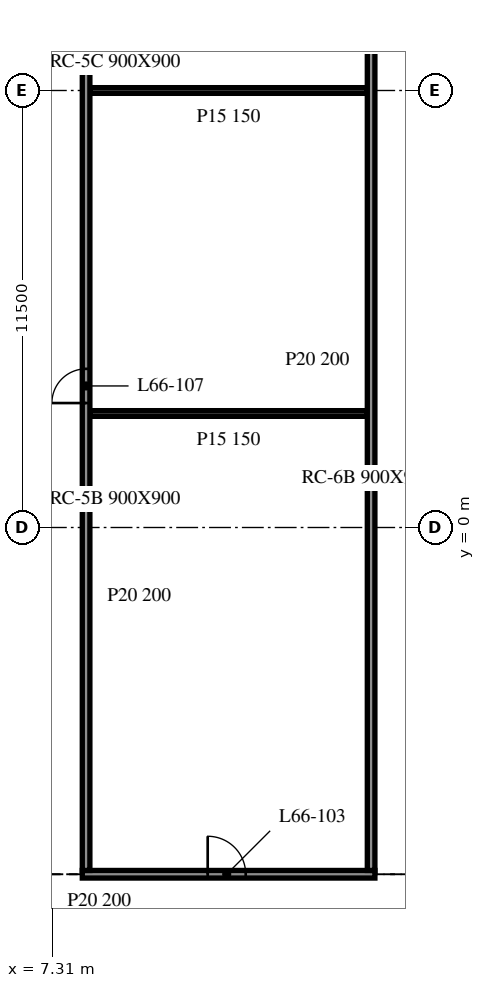
"""IFC4 building model, lengths in metres.
Left out: names, types, materials, properties, quantities, classifications, styles, units other than length and angle.
Written with IfcOpenShell. Run it as: python <this file> out.ifc"""

import sys

from ifc_helpers import new_model, si_unit, direction, frame, frame_2d, origin, place, context, subcontext, project, spatial, rectangle, extrude, element, fill, save


model = new_model("IFC4")
c1 = context("Model", 3, precision=1e-05, world=origin(), true_north=direction((0.0, 1.0)))
c2 = subcontext(c1, "Body", "Model", "MODEL_VIEW")
j1 = project(units=[si_unit("LENGTHUNIT", "METRE"), si_unit("PLANEANGLEUNIT", "RADIAN")], contexts=[c1])
p1 = place(None, origin())
s1 = spatial("IfcSite", under=j1, at=p1, CompositionType="ELEMENT")
p2 = place(p1, origin())
s2 = spatial("IfcBuilding", under=s1, at=p2, CompositionType="ELEMENT")
p3 = place(p2, frame((0.0, 0.0, 270.9)))
s3 = spatial("IfcBuildingStorey", under=s2, at=p3, CompositionType="ELEMENT", Elevation=270.9)
p4 = place(p3, frame((8.1, -9.125, 0.0), z_axis=(0.0, 0.0, 1.0), x_axis=(1.0, 0.0, 0.0)))
e1 = element("IfcWall", 1, at=p4, inside=s3, PredefinedType="PARTITIONING", context=c2, shape_type="SweptSolid", body=[
    extrude(rectangle(XDim=7.7, YDim=0.2, at=frame_2d((3.85, 0.0))), origin(), (0.0, 0.0, 1.0), 3.46),
])
p5 = place(p4, frame((3.3, 0.0, 0.0)))
e2 = element("IfcOpeningElement", 2, at=p5, cuts=e1, PredefinedType="OPENING", context=c2, shape_type="SweptSolid", body=[
    extrude(rectangle(XDim=1.0, YDim=2.1, at=frame_2d((0.5, 1.05))), frame((0.0, 0.11, 0.0), z_axis=(0.0, -1.0, 0.0), x_axis=(1.0, 0.0, 0.0)), (0.0, 0.0, 1.0), 0.22),
])
for number, where, z_axis, x_axis in (
    (3, (8.3, 3.0, 0.0), (0.0, 0.0, 1.0), (1.0, 0.0, 0.0)),
    (4, (8.3, 11.5, 0.0), (0.0, 0.0, 1.0), (1.0, 0.0, 0.0)),
):
    element("IfcWall", number, at=place(p3, frame(where, z_axis=z_axis, x_axis=x_axis)), inside=s3, PredefinedType="PARTITIONING", context=c2, shape_type="SweptSolid", body=[
        extrude(rectangle(XDim=7.3, YDim=0.15, at=frame_2d((3.65, 0.0))), origin(), (0.0, 0.0, 1.0), 3.46),
    ])
p6 = place(p3, frame((8.2, -9.025, 0.0), z_axis=(0.0, 0.0, 1.0), x_axis=(0.0, 1.0, 0.0)))
e5 = element("IfcWall", 5, at=p6, inside=s3, PredefinedType="PARTITIONING", context=c2, shape_type="SweptSolid", body=[
    extrude(rectangle(XDim=24.05, YDim=0.2, at=frame_2d((12.025, 0.0))), origin(), (0.0, 0.0, 1.0), 3.46),
])
p7 = place(p6, frame((12.3, 0.0, 0.0)))
e6 = element("IfcOpeningElement", 6, at=p7, cuts=e5, PredefinedType="OPENING", context=c2, shape_type="SweptSolid", body=[
    extrude(rectangle(XDim=0.9, YDim=2.1, at=frame_2d((0.45, 1.05))), frame((0.0, 0.11, 0.0), z_axis=(0.0, -1.0, 0.0), x_axis=(1.0, 0.0, 0.0)), (0.0, 0.0, 1.0), 0.22),
])
p8 = place(p3, frame((15.7, -9.025, 0.0), z_axis=(0.0, 0.0, 1.0), x_axis=(0.0, 1.0, 0.0)))
e7 = element("IfcWall", 7, at=p8, inside=s3, PredefinedType="PARTITIONING", context=c2, shape_type="SweptSolid", body=[
    extrude(rectangle(XDim=24.05, YDim=0.2, at=frame_2d((12.025, 0.0))), origin(), (0.0, 0.0, 1.0), 3.46),
])
p9 = place(p5, origin())
e8 = element("IfcDoor", 8, at=p9, inside=s3, OperationType="SINGLE_SWING_LEFT", PredefinedType="DOOR", context=c2, shape_type="SweptSolid", body=[
    extrude(rectangle(XDim=1.0, YDim=2.1, at=frame_2d((0.5, 1.05))), frame((0.0, 0.025, 0.0), z_axis=(0.0, -1.0, 0.0), x_axis=(1.0, 0.0, 0.0)), (0.0, 0.0, 1.0), 0.05),
])
fill(e2, e8)
p10 = place(p7, origin())
e9 = element("IfcDoor", 9, at=p10, inside=s3, OperationType="SINGLE_SWING_LEFT", PredefinedType="DOOR", context=c2, shape_type="SweptSolid", body=[
    extrude(rectangle(XDim=0.9, YDim=2.1, at=frame_2d((0.45, 1.05))), frame((0.0, 0.025, 0.0), z_axis=(0.0, -1.0, 0.0), x_axis=(1.0, 0.0, 0.0)), (0.0, 0.0, 1.0), 0.05),
])
fill(e6, e9)
save(model, sys.argv[1])
